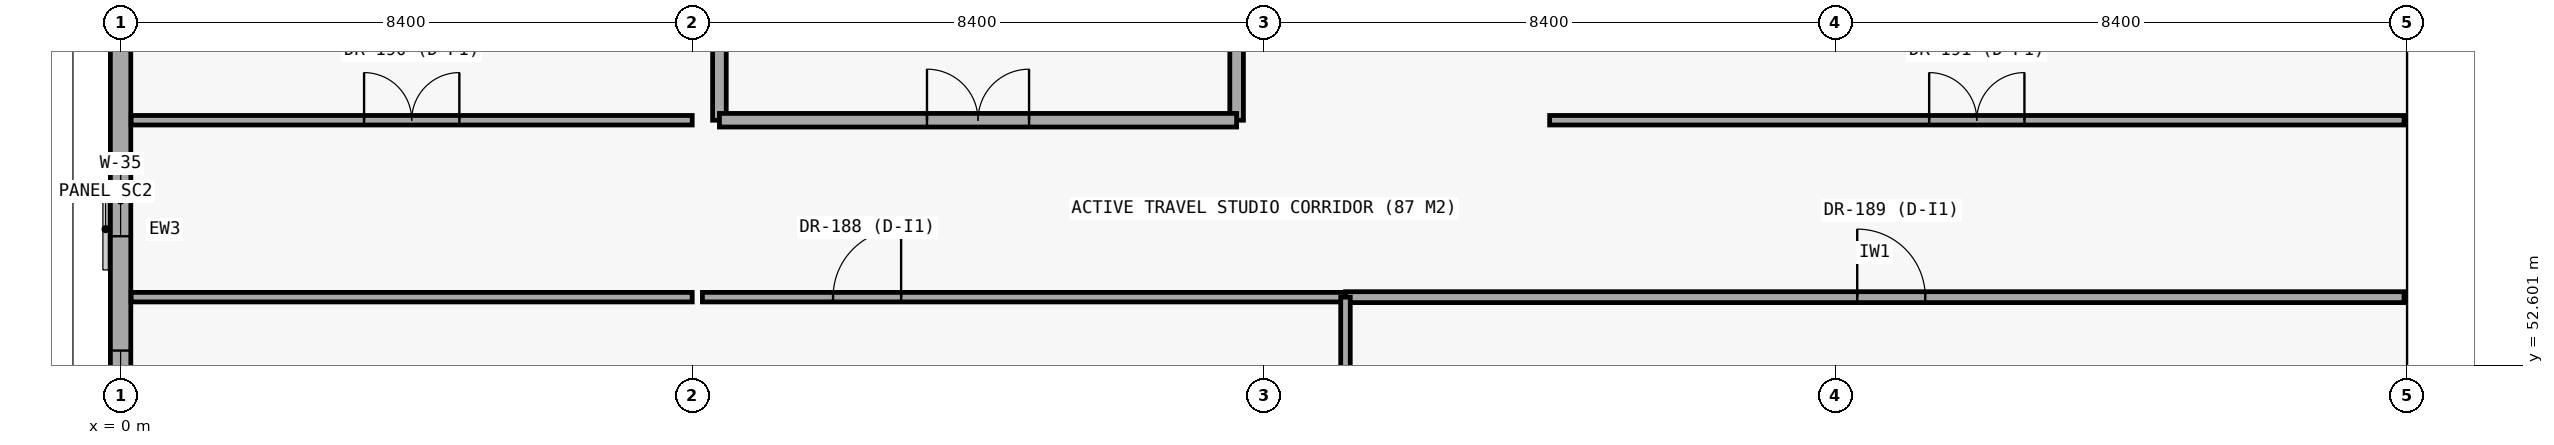
"""IFC4 building model, lengths in metres.
Left out: names, types, materials, properties, quantities, classifications, styles, units other than length and angle.
Written with IfcOpenShell. Run it as: python <this file> out.ifc"""

import sys

from ifc_helpers import new_model, si_unit, direction, frame, frame_2d, origin, place, context, subcontext, project, spatial, rectangle, extrude, element, fill, save


model = new_model("IFC4")
c1 = context("Model", 3, precision=1e-05, world=origin(), true_north=direction((0.0, 1.0)))
c2 = subcontext(c1, "Body", "Model", "MODEL_VIEW")
j1 = project(units=[si_unit("LENGTHUNIT", "METRE"), si_unit("PLANEANGLEUNIT", "RADIAN")], contexts=[c1])
p1 = place(None, origin())
s1 = spatial("IfcSite", under=j1, at=p1, CompositionType="ELEMENT")
p2 = place(p1, origin())
s2 = spatial("IfcBuilding", under=s1, at=p2, CompositionType="ELEMENT")
p3 = place(p2, frame((0.0, 0.0, 9.0)))
s3 = spatial("IfcBuildingStorey", under=s2, at=p3, CompositionType="ELEMENT", Elevation=9.0)
p4 = place(p3, frame((0.0, 58.8, 0.0), z_axis=(0.0, 0.0, 1.0), x_axis=(0.0, -1.0, 0.0)))
e1 = element("IfcWall", 1, at=p4, inside=s3, PredefinedType="STANDARD", context=c2, shape_type="SweptSolid", body=[
    extrude(rectangle(XDim=8.4, YDim=0.3, at=frame_2d((4.2, 0.0))), origin(), (0.0, 0.0, 1.0), 3.46),
])
p5 = place(p4, frame((3.255, 0.0, 0.9)))
e2 = element("IfcOpeningElement", 2, at=p5, cuts=e1, PredefinedType="OPENING", context=c2, shape_type="SweptSolid", body=[
    extrude(rectangle(XDim=1.05, YDim=2.05, at=frame_2d((0.525, 1.025))), frame((0.0, 0.16, 0.0), z_axis=(0.0, -1.0, 0.0), x_axis=(1.0, 0.0, 0.0)), (0.0, 0.0, 1.0), 0.32),
])
p6 = place(p4, frame((5.985, 0.0, 0.9)))
e3 = element("IfcOpeningElement", 3, at=p6, cuts=e1, PredefinedType="OPENING", context=c2, shape_type="SweptSolid", body=[
    extrude(rectangle(XDim=0.9, YDim=2.1, at=frame_2d((0.45, 1.05))), frame((0.0, 0.16, 0.0), z_axis=(0.0, -1.0, 0.0), x_axis=(1.0, 0.0, 0.0)), (0.0, 0.0, 1.0), 0.32),
])
for number, where, z_axis, x_axis in (
    (4, (8.8, 56.2, 0.0), (0.0, 0.0, 1.0), (0.0, 1.0, 0.0)),
    (5, (16.4, 56.2, 0.0), (0.0, 0.0, 1.0), (0.0, 1.0, 0.0)),
):
    element("IfcWall", number, at=place(p3, frame(where, z_axis=z_axis, x_axis=x_axis)), inside=s3, PredefinedType="PARTITIONING", context=c2, shape_type="SweptSolid", body=[
        extrude(rectangle(XDim=2.45, YDim=0.2, at=frame_2d((1.225, 0.0))), origin(), (0.0, 0.0, 1.0), 3.52),
    ])
p7 = place(p3, frame((8.8, 56.2, 0.0), z_axis=(0.0, 0.0, 1.0), x_axis=(1.0, 0.0, 0.0)))
e6 = element("IfcWall", 6, at=p7, inside=s3, PredefinedType="PARTITIONING", context=c2, shape_type="SweptSolid", body=[
    extrude(rectangle(XDim=7.6, YDim=0.2, at=frame_2d((3.8, 0.0))), origin(), (0.0, 0.0, 1.0), 3.52),
])
p8 = place(p7, frame((3.05, 0.0, 0.0)))
e7 = element("IfcOpeningElement", 7, at=p8, cuts=e6, PredefinedType="OPENING", context=c2, shape_type="SweptSolid", body=[
    extrude(rectangle(XDim=1.5, YDim=2.2, at=frame_2d((0.75, 1.1))), frame((0.0, 0.11, 0.0), z_axis=(0.0, -1.0, 0.0), x_axis=(1.0, 0.0, 0.0)), (0.0, 0.0, 1.0), 0.22),
])
p9 = place(p3, frame((0.155, 53.6, 0.0), z_axis=(0.0, 0.0, 1.0), x_axis=(1.0, 0.0, 0.0)))
e8 = element("IfcWall", 8, at=p9, inside=s3, PredefinedType="PARTITIONING", context=c2, shape_type="SweptSolid", body=[
    extrude(rectangle(XDim=8.245, YDim=0.14, at=frame_2d((4.123, 0.0))), origin(), (0.0, 0.0, 1.0), 3.5),
])
p10 = place(p3, frame((8.55, 53.6, 0.0), z_axis=(0.0, 0.0, 1.0), x_axis=(1.0, 0.0, 0.0)))
e9 = element("IfcWall", 9, at=p10, inside=s3, PredefinedType="PARTITIONING", context=c2, shape_type="SweptSolid", body=[
    extrude(rectangle(XDim=9.45, YDim=0.14, at=frame_2d((4.725, 0.0))), origin(), (0.0, 0.0, 1.0), 3.5),
])
p11 = place(p10, frame((1.92, 0.0, 0.0)))
e10 = element("IfcOpeningElement", 10, at=p11, cuts=e9, PredefinedType="OPENING", context=c2, shape_type="SweptSolid", body=[
    extrude(rectangle(XDim=1.0, YDim=2.15, at=frame_2d((0.5, 1.075))), frame((0.0, 0.08, 0.0), z_axis=(0.0, -1.0, 0.0), x_axis=(1.0, 0.0, 0.0)), (0.0, 0.0, 1.0), 0.16),
])
p12 = place(p3, frame((18.0, 53.6, 0.0), z_axis=(0.0, 0.0, 1.0), x_axis=(1.0, 0.0, 0.0)))
e11 = element("IfcWall", 11, at=p12, inside=s3, PredefinedType="PARTITIONING", context=c2, shape_type="SweptSolid", body=[
    extrude(rectangle(XDim=15.555, YDim=0.16, at=frame_2d((7.777, 0.0))), origin(), (0.0, 0.0, 1.0), 3.5),
])
p13 = place(p12, frame((7.52, 0.0, 0.0)))
e12 = element("IfcOpeningElement", 12, at=p13, cuts=e11, PredefinedType="OPENING", context=c2, shape_type="SweptSolid", body=[
    extrude(rectangle(XDim=1.0, YDim=2.15, at=frame_2d((0.5, 1.075))), frame((0.0, 0.09, 0.0), z_axis=(0.0, -1.0, 0.0), x_axis=(1.0, 0.0, 0.0)), (0.0, 0.0, 1.0), 0.18),
])
p14 = place(p3, frame((0.155, 56.2, 0.0), z_axis=(0.0, 0.0, 1.0), x_axis=(1.0, 0.0, 0.0)))
e13 = element("IfcWall", 13, at=p14, inside=s3, PredefinedType="PARTITIONING", context=c2, shape_type="SweptSolid", body=[
    extrude(rectangle(XDim=8.245, YDim=0.14, at=frame_2d((4.123, 0.0))), origin(), (0.0, 0.0, 1.0), 3.5),
])
p15 = place(p14, frame((3.423, 0.0, 0.0)))
e14 = element("IfcOpeningElement", 14, at=p15, cuts=e13, PredefinedType="OPENING", context=c2, shape_type="SweptSolid", body=[
    extrude(rectangle(XDim=1.4, YDim=2.25, at=frame_2d((0.7, 1.125))), frame((0.0, 0.08, 0.0), z_axis=(0.0, -1.0, 0.0), x_axis=(1.0, 0.0, 0.0)), (0.0, 0.0, 1.0), 0.16),
])
p16 = place(p3, frame((21.0, 56.2, 0.0), z_axis=(0.0, 0.0, 1.0), x_axis=(1.0, 0.0, 0.0)))
e15 = element("IfcWall", 15, at=p16, inside=s3, PredefinedType="PARTITIONING", context=c2, shape_type="SweptSolid", body=[
    extrude(rectangle(XDim=12.555, YDim=0.14, at=frame_2d((6.277, 0.0))), origin(), (0.0, 0.0, 1.0), 3.5),
])
p17 = place(p16, frame((5.577, 0.0, 0.0)))
e16 = element("IfcOpeningElement", 16, at=p17, cuts=e15, PredefinedType="OPENING", context=c2, shape_type="SweptSolid", body=[
    extrude(rectangle(XDim=1.4, YDim=2.25, at=frame_2d((0.7, 1.125))), frame((0.0, 0.08, 0.0), z_axis=(0.0, -1.0, 0.0), x_axis=(1.0, 0.0, 0.0)), (0.0, 0.0, 1.0), 0.16),
])
p18 = place(p3, frame((18.0, 42.0, 0.0), z_axis=(0.0, 0.0, 1.0), x_axis=(0.0, 1.0, 0.0)))
e17 = element("IfcWall", 17, at=p18, inside=s3, PredefinedType="PARTITIONING", context=c2, shape_type="SweptSolid", body=[
    extrude(rectangle(XDim=11.6, YDim=0.14, at=frame_2d((5.8, 0.0))), origin(), (0.0, 0.0, 1.0), 3.5),
])
p19 = place(p5, origin())
e18 = element("IfcWindow", 18, at=p19, inside=s3, PartitioningType="SINGLE_PANEL", PredefinedType="WINDOW", context=c2, shape_type="SweptSolid", body=[
    extrude(rectangle(XDim=1.05, YDim=2.05, at=frame_2d((0.525, 1.025))), frame((0.0, 0.03, 0.0), z_axis=(0.0, -1.0, 0.0), x_axis=(1.0, 0.0, 0.0)), (0.0, 0.0, 1.0), 0.06),
])
fill(e2, e18)
p20 = place(p6, origin())
e19 = element("IfcWindow", 19, at=p20, inside=s3, PartitioningType="SINGLE_PANEL", PredefinedType="WINDOW", context=c2, shape_type="SweptSolid", body=[
    extrude(rectangle(XDim=0.9, YDim=2.1, at=frame_2d((0.45, 1.05))), frame((0.0, 0.03, 0.0), z_axis=(0.0, -1.0, 0.0), x_axis=(1.0, 0.0, 0.0)), (0.0, 0.0, 1.0), 0.06),
])
fill(e3, e19)
p21 = place(p8, origin())
e20 = element("IfcDoor", 20, at=p21, inside=s3, OperationType="DOUBLE_DOOR_SINGLE_SWING", PredefinedType="DOOR", context=c2, shape_type="SweptSolid", body=[
    extrude(rectangle(XDim=1.5, YDim=2.2, at=frame_2d((0.75, 1.1))), frame((0.0, 0.025, 0.0), z_axis=(0.0, -1.0, 0.0), x_axis=(1.0, 0.0, 0.0)), (0.0, 0.0, 1.0), 0.05),
])
fill(e7, e20)
p22 = place(p11, origin())
e21 = element("IfcDoor", 21, at=p22, inside=s3, OperationType="SINGLE_SWING_RIGHT", PredefinedType="DOOR", context=c2, shape_type="SweptSolid", body=[
    extrude(rectangle(XDim=1.0, YDim=2.15, at=frame_2d((0.5, 1.075))), frame((0.0, 0.025, 0.0), z_axis=(0.0, -1.0, 0.0), x_axis=(1.0, 0.0, 0.0)), (0.0, 0.0, 1.0), 0.05),
])
fill(e10, e21)
p23 = place(p13, origin())
e22 = element("IfcDoor", 22, at=p23, inside=s3, OperationType="SINGLE_SWING_LEFT", PredefinedType="DOOR", context=c2, shape_type="SweptSolid", body=[
    extrude(rectangle(XDim=1.0, YDim=2.15, at=frame_2d((0.5, 1.075))), frame((0.0, 0.025, 0.0), z_axis=(0.0, -1.0, 0.0), x_axis=(1.0, 0.0, 0.0)), (0.0, 0.0, 1.0), 0.05),
])
fill(e12, e22)
p24 = place(p15, origin())
e23 = element("IfcDoor", 23, at=p24, inside=s3, OperationType="DOUBLE_DOOR_SINGLE_SWING", PredefinedType="DOOR", context=c2, shape_type="SweptSolid", body=[
    extrude(rectangle(XDim=1.4, YDim=2.25, at=frame_2d((0.7, 1.125))), frame((0.0, 0.025, 0.0), z_axis=(0.0, -1.0, 0.0), x_axis=(1.0, 0.0, 0.0)), (0.0, 0.0, 1.0), 0.05),
])
fill(e14, e23)
p25 = place(p17, origin())
e24 = element("IfcDoor", 24, at=p25, inside=s3, OperationType="DOUBLE_DOOR_SINGLE_SWING", PredefinedType="DOOR", context=c2, shape_type="SweptSolid", body=[
    extrude(rectangle(XDim=1.4, YDim=2.25, at=frame_2d((0.7, 1.125))), frame((0.0, 0.025, 0.0), z_axis=(0.0, -1.0, 0.0), x_axis=(1.0, 0.0, 0.0)), (0.0, 0.0, 1.0), 0.05),
])
fill(e16, e24)
save(model, sys.argv[1])
